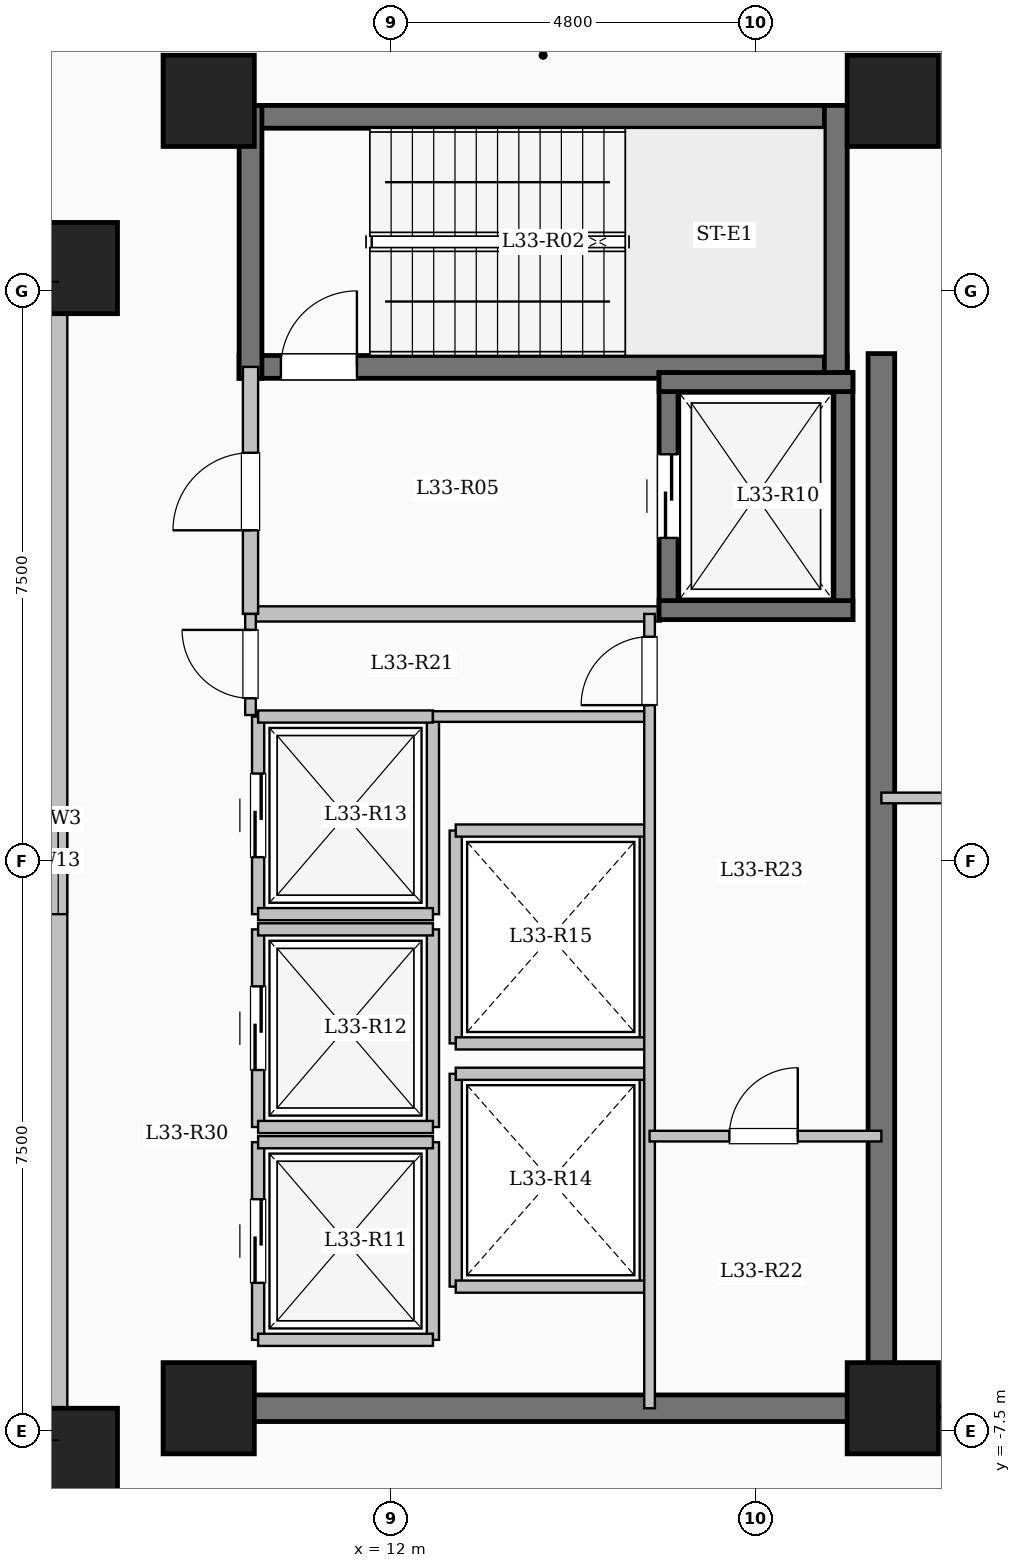
"""IFC4 building model, lengths in metres.
Left out: names, types, materials, properties, quantities, classifications, styles, units other than length and angle.
Written with IfcOpenShell. Run it as: python <this file> out.ifc"""

import sys

from ifc_helpers import new_model, si_unit, direction, frame, frame_2d, origin, origin_2d, place, context, subcontext, project, spatial, rectangle, extrude, element, fill, save


model = new_model("IFC4")
c1 = context("Model", 3, precision=1e-05, world=origin(), true_north=direction((0.0, 1.0)))
c2 = subcontext(c1, "Body", "Model", "MODEL_VIEW")
j1 = project(units=[si_unit("LENGTHUNIT", "METRE"), si_unit("PLANEANGLEUNIT", "RADIAN")], contexts=[c1])
p1 = place(None, origin())
s1 = spatial("IfcSite", under=j1, at=p1, CompositionType="ELEMENT")
p2 = place(p1, origin())
s2 = spatial("IfcBuilding", under=s1, at=p2, CompositionType="ELEMENT")
p3 = place(p2, frame((0.0, 0.0, 123.0)))
s3 = spatial("IfcBuildingStorey", under=s2, at=p3, CompositionType="ELEMENT", Elevation=123.0)
for number, where, z_axis, x_axis in (
    (1, (7.8, -7.8, 0.0), (0.0, 0.0, 1.0), (1.0, 0.0, 0.0)),
    (2, (7.8, 7.8, 0.0), (0.0, 0.0, 1.0), (1.0, 0.0, 0.0)),
    (3, (9.6, -7.2, 0.0), (0.0, 0.0, 1.0), (1.0, 0.0, 0.0)),
    (4, (9.6, 10.0, 0.0), (0.0, 0.0, 1.0), (1.0, 0.0, 0.0)),
    (5, (18.6, -7.2, 0.0), (0.0, 0.0, 1.0), (1.0, 0.0, 0.0)),
    (6, (18.6, 10.0, 0.0), (0.0, 0.0, 1.0), (1.0, 0.0, 0.0)),
):
    element("IfcColumn", number, at=place(p3, frame(where, z_axis=z_axis, x_axis=x_axis)), inside=s3, PredefinedType="COLUMN", context=c2, shape_type="SweptSolid", body=[
        extrude(rectangle(XDim=1.2, YDim=1.2, at=origin_2d()), origin(), (0.0, 0.0, 1.0), 4.5),
    ])
p4 = place(p3, frame((7.62, -7.62, 0.0), z_axis=(0.0, 0.0, 1.0), x_axis=(0.0, 1.0, 0.0)))
e7 = element("IfcWall", 7, at=p4, inside=s3, PredefinedType="SOLIDWALL", context=c2, shape_type="SweptSolid", body=[
    extrude(rectangle(XDim=15.24, YDim=0.24, at=frame_2d((7.62, 0.0))), origin(), (0.0, 0.0, 1.0), 4.2),
])
p5 = place(p4, frame((6.92, 0.0, 0.95)))
e8 = element("IfcOpeningElement", 8, at=p5, cuts=e7, PredefinedType="OPENING", context=c2, shape_type="SweptSolid", body=[
    extrude(rectangle(XDim=1.4, YDim=1.5, at=frame_2d((0.7, 0.75))), frame((0.0, 0.13, 0.0), z_axis=(0.0, -1.0, 0.0), x_axis=(1.0, 0.0, 0.0)), (0.0, 0.0, 1.0), 0.26),
])
p6 = place(p3, frame((10.0, 9.79, 0.0), z_axis=(0.0, 0.0, 1.0), x_axis=(1.0, 0.0, 0.0)))
e9 = element("IfcWall", 9, at=p6, inside=s3, PredefinedType="SHEAR", context=c2, shape_type="SweptSolid", body=[
    extrude(rectangle(XDim=8.0, YDim=0.3, at=frame_2d((4.0, 0.0))), origin(), (0.0, 0.0, 1.0), 4.5),
])
p7 = place(p3, frame((10.0, 6.5, 0.0), z_axis=(0.0, 0.0, 1.0), x_axis=(1.0, 0.0, 0.0)))
e10 = element("IfcWall", 10, at=p7, inside=s3, PredefinedType="SHEAR", context=c2, shape_type="SweptSolid", body=[
    extrude(rectangle(XDim=8.0, YDim=0.3, at=frame_2d((4.0, 0.0))), origin(), (0.0, 0.0, 1.0), 4.5),
])
p8 = place(p7, frame((0.55, 0.0, 0.0)))
e11 = element("IfcOpeningElement", 11, at=p8, cuts=e10, PredefinedType="OPENING", context=c2, shape_type="SweptSolid", body=[
    extrude(rectangle(XDim=1.0, YDim=2.15, at=frame_2d((0.5, 1.075))), frame((0.0, 0.16, 0.0), z_axis=(0.0, -1.0, 0.0), x_axis=(1.0, 0.0, 0.0)), (0.0, 0.0, 1.0), 0.32),
])
for number, where, z_axis, x_axis in (
    (12, (10.15, 6.35, 0.0), (0.0, 0.0, 1.0), (0.0, 1.0, 0.0)),
    (13, (17.85, 6.35, 0.0), (0.0, 0.0, 1.0), (0.0, 1.0, 0.0)),
):
    element("IfcWall", number, at=place(p3, frame(where, z_axis=z_axis, x_axis=x_axis)), inside=s3, PredefinedType="SHEAR", context=c2, shape_type="SweptSolid", body=[
        extrude(rectangle(XDim=3.59, YDim=0.3, at=frame_2d((1.795, 0.0))), origin(), (0.0, 0.0, 1.0), 4.5),
    ])
p9 = place(p3, frame((10.15, 3.25, 0.0), z_axis=(0.0, 0.0, 1.0), x_axis=(1.0, 0.0, 0.0)))
e14 = element("IfcWall", 14, at=p9, inside=s3, PredefinedType="SOLIDWALL", context=c2, shape_type="SweptSolid", body=[
    extrude(rectangle(XDim=5.4, YDim=0.2, at=frame_2d((2.7, 0.0))), origin(), (0.0, 0.0, 1.0), 4.2),
])
p10 = place(p3, frame((10.15, 3.25, 0.0), z_axis=(0.0, 0.0, 1.0), x_axis=(0.0, 1.0, 0.0)))
e15 = element("IfcWall", 15, at=p10, inside=s3, PredefinedType="SOLIDWALL", context=c2, shape_type="SweptSolid", body=[
    extrude(rectangle(XDim=3.25, YDim=0.2, at=frame_2d((1.625, 0.0))), origin(), (0.0, 0.0, 1.0), 4.2),
])
p11 = place(p10, frame((1.1, 0.0, 0.0)))
e16 = element("IfcOpeningElement", 16, at=p11, cuts=e15, PredefinedType="OPENING", context=c2, shape_type="SweptSolid", body=[
    extrude(rectangle(XDim=1.02, YDim=2.15, at=frame_2d((0.51, 1.075))), frame((0.0, 0.11, 0.0), z_axis=(0.0, -1.0, 0.0), x_axis=(1.0, 0.0, 0.0)), (0.0, 0.0, 1.0), 0.22),
])
p12 = place(p3, frame((15.65, 3.175, 0.0), z_axis=(0.0, 0.0, 1.0), x_axis=(0.0, 1.0, 0.0)))
e17 = element("IfcWall", 17, at=p12, inside=s3, PredefinedType="SHEAR", context=c2, shape_type="SweptSolid", body=[
    extrude(rectangle(XDim=3.25, YDim=0.25, at=frame_2d((1.625, 0.0))), origin(), (0.0, 0.0, 1.0), 4.5),
])
p13 = place(p12, frame((1.075, 0.0, 0.0)))
e18 = element("IfcOpeningElement", 18, at=p13, cuts=e17, PredefinedType="OPENING", context=c2, shape_type="SweptSolid", body=[
    extrude(rectangle(XDim=1.1, YDim=2.15, at=frame_2d((0.55, 1.075))), frame((0.0, 0.135, 0.0), z_axis=(0.0, -1.0, 0.0), x_axis=(1.0, 0.0, 0.0)), (0.0, 0.0, 1.0), 0.27),
])
p14 = place(p3, frame((17.95, 3.175, 0.0), z_axis=(0.0, 0.0, 1.0), x_axis=(0.0, 1.0, 0.0)))
e19 = element("IfcWall", 19, at=p14, inside=s3, PredefinedType="SHEAR", context=c2, shape_type="SweptSolid", body=[
    extrude(rectangle(XDim=3.25, YDim=0.25, at=frame_2d((1.625, 0.0))), origin(), (0.0, 0.0, 1.0), 4.5),
])
for number, where, z_axis, x_axis in (
    (20, (15.525, 3.3, 0.0), (0.0, 0.0, 1.0), (1.0, 0.0, 0.0)),
    (21, (15.525, 6.3, 0.0), (0.0, 0.0, 1.0), (1.0, 0.0, 0.0)),
):
    element("IfcWall", number, at=place(p3, frame(where, z_axis=z_axis, x_axis=x_axis)), inside=s3, PredefinedType="SHEAR", context=c2, shape_type="SweptSolid", body=[
        extrude(rectangle(XDim=2.55, YDim=0.25, at=frame_2d((1.275, 0.0))), origin(), (0.0, 0.0, 1.0), 4.5),
    ])
p15 = place(p3, frame((10.25, -6.3, 0.0), z_axis=(0.0, 0.0, 1.0), x_axis=(0.0, 1.0, 0.0)))
e22 = element("IfcWall", 22, at=p15, inside=s3, PredefinedType="SOLIDWALL", context=c2, shape_type="SweptSolid", body=[
    extrude(rectangle(XDim=2.6, YDim=0.16, at=frame_2d((1.3, 0.0))), origin(), (0.0, 0.0, 1.0), 4.2),
])
p16 = place(p15, frame((0.75, 0.0, 0.0)))
e23 = element("IfcOpeningElement", 23, at=p16, cuts=e22, PredefinedType="OPENING", context=c2, shape_type="SweptSolid", body=[
    extrude(rectangle(XDim=1.1, YDim=2.15, at=frame_2d((0.55, 1.075))), frame((0.0, 0.09, 0.0), z_axis=(0.0, -1.0, 0.0), x_axis=(1.0, 0.0, 0.0)), (0.0, 0.0, 1.0), 0.18),
])
p17 = place(p3, frame((12.55, -6.3, 0.0), z_axis=(0.0, 0.0, 1.0), x_axis=(0.0, 1.0, 0.0)))
e24 = element("IfcWall", 24, at=p17, inside=s3, PredefinedType="SOLIDWALL", context=c2, shape_type="SweptSolid", body=[
    extrude(rectangle(XDim=2.6, YDim=0.16, at=frame_2d((1.3, 0.0))), origin(), (0.0, 0.0, 1.0), 4.2),
])
for number, where, z_axis, x_axis in (
    (25, (10.25, -6.3, 0.0), (0.0, 0.0, 1.0), (1.0, 0.0, 0.0)),
    (26, (10.25, -3.7, 0.0), (0.0, 0.0, 1.0), (1.0, 0.0, 0.0)),
):
    element("IfcWall", number, at=place(p3, frame(where, z_axis=z_axis, x_axis=x_axis)), inside=s3, PredefinedType="SOLIDWALL", context=c2, shape_type="SweptSolid", body=[
        extrude(rectangle(XDim=2.3, YDim=0.16, at=frame_2d((1.15, 0.0))), origin(), (0.0, 0.0, 1.0), 4.2),
    ])
p18 = place(p3, frame((10.25, -3.5, 0.0), z_axis=(0.0, 0.0, 1.0), x_axis=(0.0, 1.0, 0.0)))
e27 = element("IfcWall", 27, at=p18, inside=s3, PredefinedType="SOLIDWALL", context=c2, shape_type="SweptSolid", body=[
    extrude(rectangle(XDim=2.6, YDim=0.16, at=frame_2d((1.3, 0.0))), origin(), (0.0, 0.0, 1.0), 4.2),
])
p19 = place(p18, frame((0.75, 0.0, 0.0)))
e28 = element("IfcOpeningElement", 28, at=p19, cuts=e27, PredefinedType="OPENING", context=c2, shape_type="SweptSolid", body=[
    extrude(rectangle(XDim=1.1, YDim=2.15, at=frame_2d((0.55, 1.075))), frame((0.0, 0.09, 0.0), z_axis=(0.0, -1.0, 0.0), x_axis=(1.0, 0.0, 0.0)), (0.0, 0.0, 1.0), 0.18),
])
p20 = place(p3, frame((12.55, -3.5, 0.0), z_axis=(0.0, 0.0, 1.0), x_axis=(0.0, 1.0, 0.0)))
e29 = element("IfcWall", 29, at=p20, inside=s3, PredefinedType="SOLIDWALL", context=c2, shape_type="SweptSolid", body=[
    extrude(rectangle(XDim=2.6, YDim=0.16, at=frame_2d((1.3, 0.0))), origin(), (0.0, 0.0, 1.0), 4.2),
])
for number, where, z_axis, x_axis in (
    (30, (10.25, -3.5, 0.0), (0.0, 0.0, 1.0), (1.0, 0.0, 0.0)),
    (31, (10.25, -0.9, 0.0), (0.0, 0.0, 1.0), (1.0, 0.0, 0.0)),
):
    element("IfcWall", number, at=place(p3, frame(where, z_axis=z_axis, x_axis=x_axis)), inside=s3, PredefinedType="SOLIDWALL", context=c2, shape_type="SweptSolid", body=[
        extrude(rectangle(XDim=2.3, YDim=0.16, at=frame_2d((1.15, 0.0))), origin(), (0.0, 0.0, 1.0), 4.2),
    ])
p21 = place(p3, frame((10.25, -0.7, 0.0), z_axis=(0.0, 0.0, 1.0), x_axis=(0.0, 1.0, 0.0)))
e32 = element("IfcWall", 32, at=p21, inside=s3, PredefinedType="SOLIDWALL", context=c2, shape_type="SweptSolid", body=[
    extrude(rectangle(XDim=2.6, YDim=0.16, at=frame_2d((1.3, 0.0))), origin(), (0.0, 0.0, 1.0), 4.2),
])
p22 = place(p21, frame((0.75, 0.0, 0.0)))
e33 = element("IfcOpeningElement", 33, at=p22, cuts=e32, PredefinedType="OPENING", context=c2, shape_type="SweptSolid", body=[
    extrude(rectangle(XDim=1.1, YDim=2.15, at=frame_2d((0.55, 1.075))), frame((0.0, 0.09, 0.0), z_axis=(0.0, -1.0, 0.0), x_axis=(1.0, 0.0, 0.0)), (0.0, 0.0, 1.0), 0.18),
])
p23 = place(p3, frame((12.55, -0.7, 0.0), z_axis=(0.0, 0.0, 1.0), x_axis=(0.0, 1.0, 0.0)))
e34 = element("IfcWall", 34, at=p23, inside=s3, PredefinedType="SOLIDWALL", context=c2, shape_type="SweptSolid", body=[
    extrude(rectangle(XDim=2.6, YDim=0.16, at=frame_2d((1.3, 0.0))), origin(), (0.0, 0.0, 1.0), 4.2),
])
for number, where, z_axis, x_axis in (
    (35, (10.25, -0.7, 0.0), (0.0, 0.0, 1.0), (1.0, 0.0, 0.0)),
    (36, (10.25, 1.9, 0.0), (0.0, 0.0, 1.0), (1.0, 0.0, 0.0)),
):
    element("IfcWall", number, at=place(p3, frame(where, z_axis=z_axis, x_axis=x_axis)), inside=s3, PredefinedType="SOLIDWALL", context=c2, shape_type="SweptSolid", body=[
        extrude(rectangle(XDim=2.3, YDim=0.16, at=frame_2d((1.15, 0.0))), origin(), (0.0, 0.0, 1.0), 4.2),
    ])
for number, where, z_axis, x_axis in (
    (37, (12.85, -5.6, 0.0), (0.0, 0.0, 1.0), (0.0, 1.0, 0.0)),
    (38, (15.35, -5.6, 0.0), (0.0, 0.0, 1.0), (0.0, 1.0, 0.0)),
):
    element("IfcWall", number, at=place(p3, frame(where, z_axis=z_axis, x_axis=x_axis)), inside=s3, PredefinedType="SOLIDWALL", context=c2, shape_type="SweptSolid", body=[
        extrude(rectangle(XDim=2.8, YDim=0.16, at=frame_2d((1.4, 0.0))), origin(), (0.0, 0.0, 1.0), 4.2),
    ])
for number, where, z_axis, x_axis in (
    (39, (12.85, -5.6, 0.0), (0.0, 0.0, 1.0), (1.0, 0.0, 0.0)),
    (40, (12.85, -2.8, 0.0), (0.0, 0.0, 1.0), (1.0, 0.0, 0.0)),
):
    element("IfcWall", number, at=place(p3, frame(where, z_axis=z_axis, x_axis=x_axis)), inside=s3, PredefinedType="SOLIDWALL", context=c2, shape_type="SweptSolid", body=[
        extrude(rectangle(XDim=2.5, YDim=0.16, at=frame_2d((1.25, 0.0))), origin(), (0.0, 0.0, 1.0), 4.2),
    ])
for number, where, z_axis, x_axis in (
    (41, (12.85, -2.4, 0.0), (0.0, 0.0, 1.0), (0.0, 1.0, 0.0)),
    (42, (15.35, -2.4, 0.0), (0.0, 0.0, 1.0), (0.0, 1.0, 0.0)),
):
    element("IfcWall", number, at=place(p3, frame(where, z_axis=z_axis, x_axis=x_axis)), inside=s3, PredefinedType="SOLIDWALL", context=c2, shape_type="SweptSolid", body=[
        extrude(rectangle(XDim=2.8, YDim=0.16, at=frame_2d((1.4, 0.0))), origin(), (0.0, 0.0, 1.0), 4.2),
    ])
for number, where, z_axis, x_axis in (
    (43, (12.85, -2.4, 0.0), (0.0, 0.0, 1.0), (1.0, 0.0, 0.0)),
    (44, (12.85, 0.4, 0.0), (0.0, 0.0, 1.0), (1.0, 0.0, 0.0)),
):
    element("IfcWall", number, at=place(p3, frame(where, z_axis=z_axis, x_axis=x_axis)), inside=s3, PredefinedType="SOLIDWALL", context=c2, shape_type="SweptSolid", body=[
        extrude(rectangle(XDim=2.5, YDim=0.16, at=frame_2d((1.25, 0.0))), origin(), (0.0, 0.0, 1.0), 4.2),
    ])
p24 = place(p3, frame((18.45, -7.375, 0.0), z_axis=(0.0, 0.0, 1.0), x_axis=(0.0, 1.0, 0.0)))
e45 = element("IfcWall", 45, at=p24, inside=s3, PredefinedType="SHEAR", context=c2, shape_type="SweptSolid", body=[
    extrude(rectangle(XDim=14.05, YDim=0.35, at=frame_2d((7.025, 0.0))), origin(), (0.0, 0.0, 1.0), 4.5),
])
p25 = place(p3, frame((10.075, -7.2, 0.0), z_axis=(0.0, 0.0, 1.0), x_axis=(1.0, 0.0, 0.0)))
e46 = element("IfcWall", 46, at=p25, inside=s3, PredefinedType="SHEAR", context=c2, shape_type="SweptSolid", body=[
    extrude(rectangle(XDim=8.55, YDim=0.35, at=frame_2d((4.275, 0.0))), origin(), (0.0, 0.0, 1.0), 4.5),
])
p26 = place(p3, frame((12.55, 1.9, 0.0), z_axis=(0.0, 0.0, 1.0), x_axis=(1.0, 0.0, 0.0)))
e47 = element("IfcWall", 47, at=p26, inside=s3, PredefinedType="PARTITIONING", context=c2, shape_type="SweptSolid", body=[
    extrude(rectangle(XDim=2.85, YDim=0.14, at=frame_2d((1.425, 0.0))), origin(), (0.0, 0.0, 1.0), 4.2),
])
p27 = place(p3, frame((10.15, 1.92, 0.0), z_axis=(0.0, 0.0, 1.0), x_axis=(0.0, 1.0, 0.0)))
e48 = element("IfcWall", 48, at=p27, inside=s3, PredefinedType="PARTITIONING", context=c2, shape_type="SweptSolid", body=[
    extrude(rectangle(XDim=1.33, YDim=0.14, at=frame_2d((0.665, 0.0))), origin(), (0.0, 0.0, 1.0), 4.2),
])
p28 = place(p27, frame((0.22, 0.0, 0.0)))
e49 = element("IfcOpeningElement", 49, at=p28, cuts=e48, PredefinedType="OPENING", context=c2, shape_type="SweptSolid", body=[
    extrude(rectangle(XDim=0.9, YDim=2.08, at=frame_2d((0.45, 1.04))), frame((0.0, 0.08, 0.0), z_axis=(0.0, -1.0, 0.0), x_axis=(1.0, 0.0, 0.0)), (0.0, 0.0, 1.0), 0.16),
])
p29 = place(p3, frame((15.4, -7.2, 0.0), z_axis=(0.0, 0.0, 1.0), x_axis=(0.0, 1.0, 0.0)))
e50 = element("IfcWall", 50, at=p29, inside=s3, PredefinedType="PARTITIONING", context=c2, shape_type="SweptSolid", body=[
    extrude(rectangle(XDim=10.45, YDim=0.14, at=frame_2d((5.225, 0.0))), origin(), (0.0, 0.0, 1.0), 4.2),
])
p30 = place(p29, frame((9.25, 0.0, 0.0)))
e51 = element("IfcOpeningElement", 51, at=p30, cuts=e50, PredefinedType="OPENING", context=c2, shape_type="SweptSolid", body=[
    extrude(rectangle(XDim=0.9, YDim=2.08, at=frame_2d((0.45, 1.04))), frame((0.0, 0.08, 0.0), z_axis=(0.0, -1.0, 0.0), x_axis=(1.0, 0.0, 0.0)), (0.0, 0.0, 1.0), 0.16),
])
p31 = place(p3, frame((15.4, -3.62, 0.0), z_axis=(0.0, 0.0, 1.0), x_axis=(1.0, 0.0, 0.0)))
e52 = element("IfcWall", 52, at=p31, inside=s3, PredefinedType="PARTITIONING", context=c2, shape_type="SweptSolid", body=[
    extrude(rectangle(XDim=3.05, YDim=0.14, at=frame_2d((1.525, 0.0))), origin(), (0.0, 0.0, 1.0), 4.2),
])
p32 = place(p31, frame((1.05, 0.0, 0.0)))
e53 = element("IfcOpeningElement", 53, at=p32, cuts=e52, PredefinedType="OPENING", context=c2, shape_type="SweptSolid", body=[
    extrude(rectangle(XDim=0.9, YDim=2.08, at=frame_2d((0.45, 1.04))), frame((0.0, 0.08, 0.0), z_axis=(0.0, -1.0, 0.0), x_axis=(1.0, 0.0, 0.0)), (0.0, 0.0, 1.0), 0.16),
])
p33 = place(p3, frame((18.45, -7.25, 0.0), z_axis=(0.0, 0.0, 1.0), x_axis=(1.0, 0.0, 0.0)))
e54 = element("IfcWall", 54, at=p33, inside=s3, PredefinedType="PARTITIONING", context=c2, shape_type="SweptSolid", body=[
    extrude(rectangle(XDim=8.43, YDim=0.15, at=frame_2d((4.215, 0.0))), origin(), (0.0, 0.0, 1.0), 4.2),
])
p34 = place(p33, frame((1.95, 0.0, 0.0)))
e55 = element("IfcOpeningElement", 55, at=p34, cuts=e54, PredefinedType="OPENING", context=c2, shape_type="SweptSolid", body=[
    extrude(rectangle(XDim=1.08, YDim=2.15, at=frame_2d((0.54, 1.075))), frame((0.0, 0.085, 0.0), z_axis=(0.0, -1.0, 0.0), x_axis=(1.0, 0.0, 0.0)), (0.0, 0.0, 1.0), 0.17),
])
p35 = place(p3, frame((18.45, 0.829, 0.0), z_axis=(0.0, 0.0, 1.0), x_axis=(1.0, 0.0, 0.0)))
e56 = element("IfcWall", 56, at=p35, inside=s3, PredefinedType="PARTITIONING", context=c2, shape_type="SweptSolid", body=[
    extrude(rectangle(XDim=8.43, YDim=0.14, at=frame_2d((4.215, 0.0))), origin(), (0.0, 0.0, 1.0), 4.2),
])
p36 = place(p35, frame((0.9, 0.0, 0.0)))
e57 = element("IfcOpeningElement", 57, at=p36, cuts=e56, PredefinedType="OPENING", context=c2, shape_type="SweptSolid", body=[
    extrude(rectangle(XDim=1.08, YDim=2.15, at=frame_2d((0.54, 1.075))), frame((0.0, 0.08, 0.0), z_axis=(0.0, -1.0, 0.0), x_axis=(1.0, 0.0, 0.0)), (0.0, 0.0, 1.0), 0.16),
])
p37 = place(p5, origin())
e58 = element("IfcWindow", 58, at=p37, inside=s3, PartitioningType="SINGLE_PANEL", PredefinedType="WINDOW", context=c2, shape_type="SweptSolid", body=[
    extrude(rectangle(XDim=1.4, YDim=1.5, at=frame_2d((0.7, 0.75))), frame((0.0, 0.03, 0.0), z_axis=(0.0, -1.0, 0.0), x_axis=(1.0, 0.0, 0.0)), (0.0, 0.0, 1.0), 0.06),
])
fill(e8, e58)
p38 = place(p8, origin())
e59 = element("IfcDoor", 59, at=p38, inside=s3, OperationType="SINGLE_SWING_RIGHT", PredefinedType="DOOR", context=c2, shape_type="SweptSolid", body=[
    extrude(rectangle(XDim=1.0, YDim=2.15, at=frame_2d((0.5, 1.075))), frame((0.0, 0.025, 0.0), z_axis=(0.0, -1.0, 0.0), x_axis=(1.0, 0.0, 0.0)), (0.0, 0.0, 1.0), 0.05),
])
fill(e11, e59)
p39 = place(p11, origin())
e60 = element("IfcDoor", 60, at=p39, inside=s3, OperationType="SINGLE_SWING_LEFT", PredefinedType="DOOR", context=c2, shape_type="SweptSolid", body=[
    extrude(rectangle(XDim=1.02, YDim=2.15, at=frame_2d((0.51, 1.075))), frame((0.0, 0.025, 0.0), z_axis=(0.0, -1.0, 0.0), x_axis=(1.0, 0.0, 0.0)), (0.0, 0.0, 1.0), 0.05),
])
fill(e16, e60)
p40 = place(p13, origin())
e61 = element("IfcDoor", 61, at=p40, inside=s3, OperationType="SLIDING_TO_LEFT", PredefinedType="DOOR", context=c2, shape_type="SweptSolid", body=[
    extrude(rectangle(XDim=1.1, YDim=2.15, at=frame_2d((0.55, 1.075))), frame((0.0, 0.025, 0.0), z_axis=(0.0, -1.0, 0.0), x_axis=(1.0, 0.0, 0.0)), (0.0, 0.0, 1.0), 0.05),
])
fill(e18, e61)
p41 = place(p16, origin())
e62 = element("IfcDoor", 62, at=p41, inside=s3, OperationType="SLIDING_TO_LEFT", PredefinedType="DOOR", context=c2, shape_type="SweptSolid", body=[
    extrude(rectangle(XDim=1.1, YDim=2.15, at=frame_2d((0.55, 1.075))), frame((0.0, 0.025, 0.0), z_axis=(0.0, -1.0, 0.0), x_axis=(1.0, 0.0, 0.0)), (0.0, 0.0, 1.0), 0.05),
])
fill(e23, e62)
p42 = place(p19, origin())
e63 = element("IfcDoor", 63, at=p42, inside=s3, OperationType="SLIDING_TO_LEFT", PredefinedType="DOOR", context=c2, shape_type="SweptSolid", body=[
    extrude(rectangle(XDim=1.1, YDim=2.15, at=frame_2d((0.55, 1.075))), frame((0.0, 0.025, 0.0), z_axis=(0.0, -1.0, 0.0), x_axis=(1.0, 0.0, 0.0)), (0.0, 0.0, 1.0), 0.05),
])
fill(e28, e63)
p43 = place(p22, origin())
e64 = element("IfcDoor", 64, at=p43, inside=s3, OperationType="SLIDING_TO_LEFT", PredefinedType="DOOR", context=c2, shape_type="SweptSolid", body=[
    extrude(rectangle(XDim=1.1, YDim=2.15, at=frame_2d((0.55, 1.075))), frame((0.0, 0.025, 0.0), z_axis=(0.0, -1.0, 0.0), x_axis=(1.0, 0.0, 0.0)), (0.0, 0.0, 1.0), 0.05),
])
fill(e33, e64)
p44 = place(p28, origin())
e65 = element("IfcDoor", 65, at=p44, inside=s3, OperationType="SINGLE_SWING_RIGHT", PredefinedType="DOOR", context=c2, shape_type="SweptSolid", body=[
    extrude(rectangle(XDim=0.9, YDim=2.08, at=frame_2d((0.45, 1.04))), frame((0.0, 0.025, 0.0), z_axis=(0.0, -1.0, 0.0), x_axis=(1.0, 0.0, 0.0)), (0.0, 0.0, 1.0), 0.05),
])
fill(e49, e65)
p45 = place(p30, origin())
e66 = element("IfcDoor", 66, at=p45, inside=s3, OperationType="SINGLE_SWING_LEFT", PredefinedType="DOOR", context=c2, shape_type="SweptSolid", body=[
    extrude(rectangle(XDim=0.9, YDim=2.08, at=frame_2d((0.45, 1.04))), frame((0.0, 0.025, 0.0), z_axis=(0.0, -1.0, 0.0), x_axis=(1.0, 0.0, 0.0)), (0.0, 0.0, 1.0), 0.05),
])
fill(e51, e66)
p46 = place(p32, origin())
e67 = element("IfcDoor", 67, at=p46, inside=s3, OperationType="SINGLE_SWING_RIGHT", PredefinedType="DOOR", context=c2, shape_type="SweptSolid", body=[
    extrude(rectangle(XDim=0.9, YDim=2.08, at=frame_2d((0.45, 1.04))), frame((0.0, 0.025, 0.0), z_axis=(0.0, -1.0, 0.0), x_axis=(1.0, 0.0, 0.0)), (0.0, 0.0, 1.0), 0.05),
])
fill(e53, e67)
save(model, sys.argv[1])
